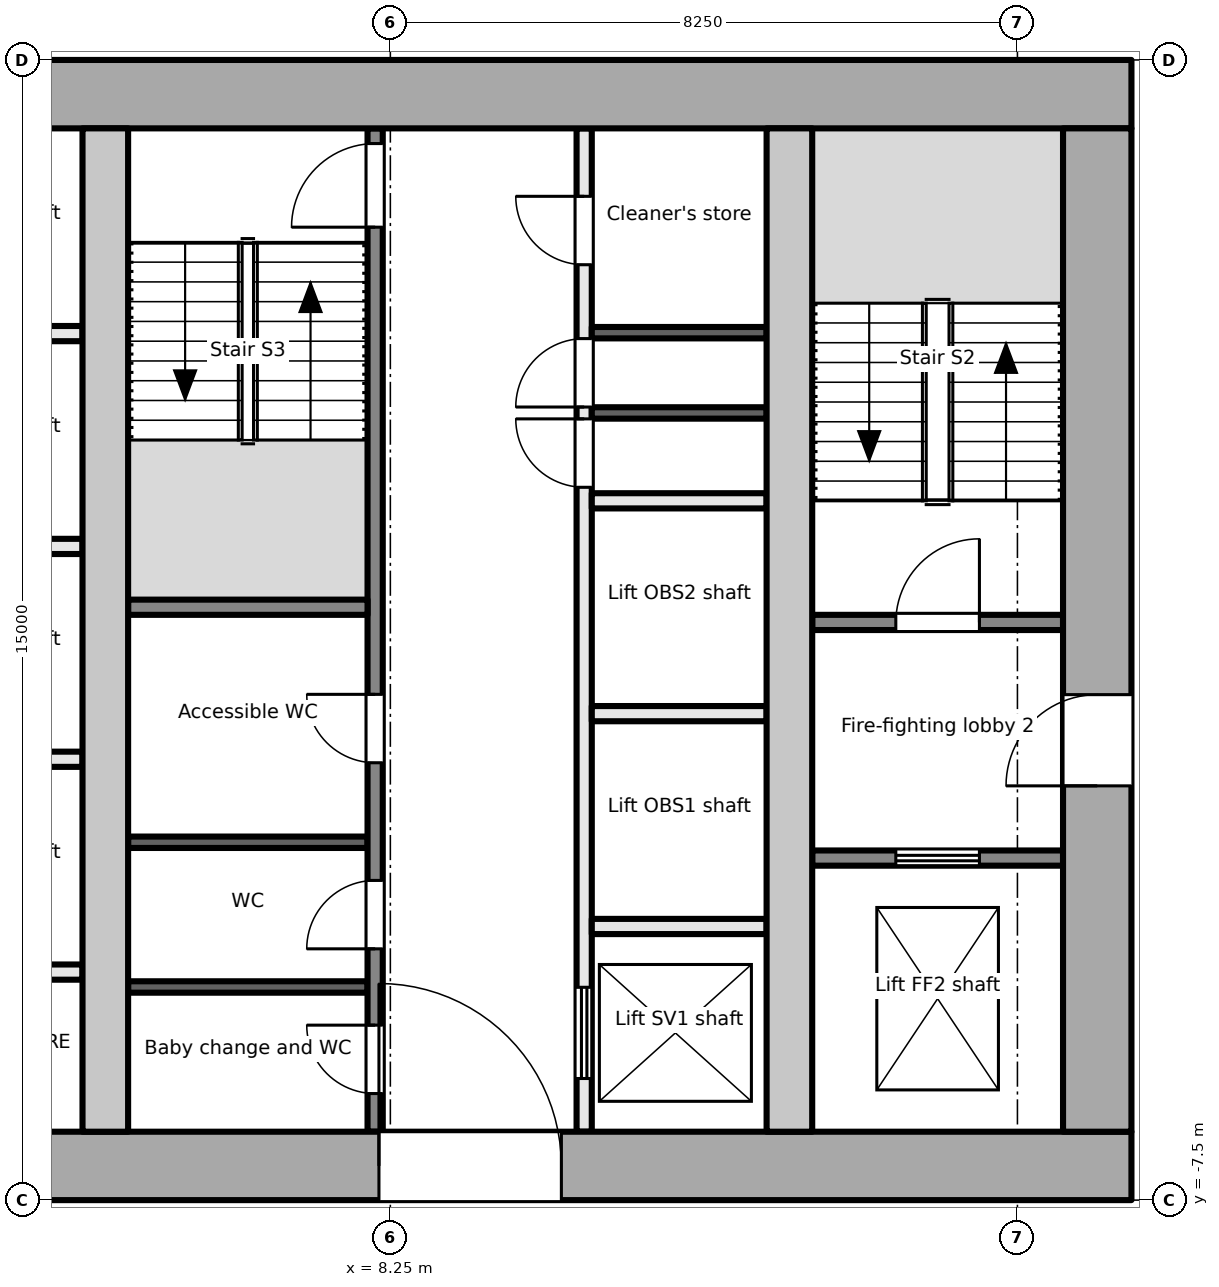
"""IFC4 building model, lengths in metres.
Left out: names, types, materials, properties, quantities, classifications, styles, units other than length and angle.
Written with IfcOpenShell. Run it as: python <this file> out.ifc"""

import sys

from ifc_helpers import new_model, si_unit, direction, frame, frame_2d, origin, place, context, subcontext, project, spatial, rectangle, extrude, element, fill, save


model = new_model("IFC4")
c1 = context("Model", 3, precision=1e-05, world=origin(), true_north=direction((0.0, 1.0)))
c2 = subcontext(c1, "Body", "Model", "MODEL_VIEW")
j1 = project(units=[si_unit("LENGTHUNIT", "METRE"), si_unit("PLANEANGLEUNIT", "RADIAN")], contexts=[c1])
p1 = place(None, origin())
s1 = spatial("IfcSite", under=j1, at=p1, CompositionType="ELEMENT")
p2 = place(p1, origin())
s2 = spatial("IfcBuilding", under=s1, at=p2, CompositionType="ELEMENT")
p3 = place(p2, frame((0.0, 0.0, 52.9)))
s3 = spatial("IfcBuildingStorey", under=s2, at=p3, CompositionType="ELEMENT", Elevation=52.9)
p4 = place(p3, frame((-18.0, -7.05, -0.2), z_axis=(0.0, 0.0, 1.0), x_axis=(1.0, 0.0, 0.0)))
e1 = element("IfcWall", 1, at=p4, inside=s3, PredefinedType="SHEAR", context=c2, shape_type="SweptSolid", body=[
    extrude(rectangle(XDim=36.0, YDim=0.9, at=frame_2d((18.0, 0.0))), origin(), (0.0, 0.0, 1.0), 4.1),
])
p5 = place(p4, frame((7.8, 0.0, 0.2)))
e2 = element("IfcOpeningElement", 2, at=p5, cuts=e1, PredefinedType="OPENING", context=c2, shape_type="SweptSolid", body=[
    extrude(rectangle(XDim=2.4, YDim=2.1, at=frame_2d((1.2, 1.05))), frame((0.0, 0.46, 0.0), z_axis=(0.0, -1.0, 0.0), x_axis=(1.0, 0.0, 0.0)), (0.0, 0.0, 1.0), 0.921),
])
p6 = place(p4, frame((17.4, 0.0, 0.2)))
e3 = element("IfcOpeningElement", 3, at=p6, cuts=e1, PredefinedType="OPENING", context=c2, shape_type="SweptSolid", body=[
    extrude(rectangle(XDim=1.2, YDim=2.1, at=frame_2d((0.6, 1.05))), frame((0.0, 0.46, 0.0), z_axis=(0.0, -1.0, 0.0), x_axis=(1.0, 0.0, 0.0)), (0.0, 0.0, 1.0), 0.921),
])
p7 = place(p4, frame((26.1, 0.0, 0.2)))
e4 = element("IfcOpeningElement", 4, at=p7, cuts=e1, PredefinedType="OPENING", context=c2, shape_type="SweptSolid", body=[
    extrude(rectangle(XDim=2.4, YDim=2.1, at=frame_2d((1.2, 1.05))), frame((0.0, 0.46, 0.0), z_axis=(0.0, -1.0, 0.0), x_axis=(1.0, 0.0, 0.0)), (0.0, 0.0, 1.0), 0.921),
])
p8 = place(p3, frame((-18.0, 7.05, -0.2), z_axis=(0.0, 0.0, 1.0), x_axis=(1.0, 0.0, 0.0)))
e5 = element("IfcWall", 5, at=p8, inside=s3, PredefinedType="SHEAR", context=c2, shape_type="SweptSolid", body=[
    extrude(rectangle(XDim=36.0, YDim=0.9, at=frame_2d((18.0, 0.0))), origin(), (0.0, 0.0, 1.0), 4.1),
])
p9 = place(p3, frame((17.55, -6.6, -0.2), z_axis=(0.0, 0.0, 1.0), x_axis=(0.0, 1.0, 0.0)))
e6 = element("IfcWall", 6, at=p9, inside=s3, PredefinedType="SHEAR", context=c2, shape_type="SweptSolid", body=[
    extrude(rectangle(XDim=13.2, YDim=0.9, at=frame_2d((6.6, 0.0))), origin(), (0.0, 0.0, 1.0), 4.1),
])
p10 = place(p9, frame((4.55, 0.0, 0.2)))
e7 = element("IfcOpeningElement", 7, at=p10, cuts=e6, PredefinedType="OPENING", context=c2, shape_type="SweptSolid", body=[
    extrude(rectangle(XDim=1.2, YDim=2.1, at=frame_2d((0.6, 1.05))), frame((0.0, 0.46, 0.0), z_axis=(0.0, -1.0, 0.0), x_axis=(1.0, 0.0, 0.0)), (0.0, 0.0, 1.0), 0.921),
])
for number, where, z_axis, x_axis in (
    (8, (4.5, -6.6, -0.2), (0.0, 0.0, 1.0), (0.0, 1.0, 0.0)),
    (9, (13.5, -6.6, -0.2), (0.0, 0.0, 1.0), (0.0, 1.0, 0.0)),
):
    element("IfcWall", number, at=place(p3, frame(where, z_axis=z_axis, x_axis=x_axis)), inside=s3, PredefinedType="SHEAR", context=c2, shape_type="SweptSolid", body=[
        extrude(rectangle(XDim=13.2, YDim=0.6, at=frame_2d((6.6, 0.0))), origin(), (0.0, 0.0, 1.0), 4.1),
    ])
p11 = place(p3, frame((13.8, -3.0, 0.0), z_axis=(0.0, 0.0, 1.0), x_axis=(1.0, 0.0, 0.0)))
e10 = element("IfcWall", 10, at=p11, inside=s3, PredefinedType="PARTITIONING", context=c2, shape_type="SweptSolid", body=[
    extrude(rectangle(XDim=3.3, YDim=0.2, at=frame_2d((1.65, 0.0))), origin(), (0.0, 0.0, 1.0), 3.9),
])
p12 = place(p11, frame((1.1, 0.0, 0.0)))
e11 = element("IfcOpeningElement", 11, at=p12, cuts=e10, PredefinedType="OPENING", context=c2, shape_type="SweptSolid", body=[
    extrude(rectangle(XDim=1.1, YDim=2.1, at=frame_2d((0.55, 1.05))), frame((0.0, 0.111, 0.0), z_axis=(0.0, -1.0, 0.0), x_axis=(1.0, 0.0, 0.0)), (0.0, 0.0, 1.0), 0.221),
])
p13 = place(p3, frame((13.8, 0.1, 0.0), z_axis=(0.0, 0.0, 1.0), x_axis=(1.0, 0.0, 0.0)))
e12 = element("IfcWall", 12, at=p13, inside=s3, PredefinedType="PARTITIONING", context=c2, shape_type="SweptSolid", body=[
    extrude(rectangle(XDim=3.3, YDim=0.2, at=frame_2d((1.65, 0.0))), origin(), (0.0, 0.0, 1.0), 3.9),
])
p14 = place(p13, frame((1.1, 0.0, 0.0)))
e13 = element("IfcOpeningElement", 13, at=p14, cuts=e12, PredefinedType="OPENING", context=c2, shape_type="SweptSolid", body=[
    extrude(rectangle(XDim=1.1, YDim=2.1, at=frame_2d((0.55, 1.05))), frame((0.0, 0.111, 0.0), z_axis=(0.0, -1.0, 0.0), x_axis=(1.0, 0.0, 0.0)), (0.0, 0.0, 1.0), 0.221),
])
for number, where, z_axis, x_axis in (
    (14, (1.9, -1.7, 0.0), (0.0, 0.0, 1.0), (1.0, 0.0, 0.0)),
    (15, (1.9, 1.1, 0.0), (0.0, 0.0, 1.0), (1.0, 0.0, 0.0)),
    (16, (1.9, 3.9, 0.0), (0.0, 0.0, 1.0), (1.0, 0.0, 0.0)),
    (17, (1.9, -4.5, 0.0), (0.0, 0.0, 1.0), (1.0, 0.0, 0.0)),
):
    element("IfcWall", number, at=place(p3, frame(where, z_axis=z_axis, x_axis=x_axis)), inside=s3, PredefinedType="PARTITIONING", context=c2, shape_type="SweptSolid", body=[
        extrude(rectangle(XDim=2.3, YDim=0.2, at=frame_2d((1.15, 0.0))), origin(), (0.0, 0.0, 1.0), 3.9),
    ])
p15 = place(p3, frame((8.05, -6.6, 0.0), z_axis=(0.0, 0.0, 1.0), x_axis=(0.0, 1.0, 0.0)))
e18 = element("IfcWall", 18, at=p15, inside=s3, PredefinedType="PARTITIONING", context=c2, shape_type="SweptSolid", body=[
    extrude(rectangle(XDim=13.2, YDim=0.2, at=frame_2d((6.6, 0.0))), origin(), (0.0, 0.0, 1.0), 3.9),
])
p16 = place(p15, frame((0.502, 0.0, 0.0)))
e19 = element("IfcOpeningElement", 19, at=p16, cuts=e18, PredefinedType="OPENING", context=c2, shape_type="SweptSolid", body=[
    extrude(rectangle(XDim=0.9, YDim=2.1, at=frame_2d((0.45, 1.05))), frame((0.0, 0.111, 0.0), z_axis=(0.0, -1.0, 0.0), x_axis=(1.0, 0.0, 0.0)), (0.0, 0.0, 1.0), 0.221),
])
p17 = place(p15, frame((2.406, 0.0, 0.0)))
e20 = element("IfcOpeningElement", 20, at=p17, cuts=e18, PredefinedType="OPENING", context=c2, shape_type="SweptSolid", body=[
    extrude(rectangle(XDim=0.9, YDim=2.1, at=frame_2d((0.45, 1.05))), frame((0.0, 0.111, 0.0), z_axis=(0.0, -1.0, 0.0), x_axis=(1.0, 0.0, 0.0)), (0.0, 0.0, 1.0), 0.221),
])
p18 = place(p15, frame((4.854, 0.0, 0.0)))
e21 = element("IfcOpeningElement", 21, at=p18, cuts=e18, PredefinedType="OPENING", context=c2, shape_type="SweptSolid", body=[
    extrude(rectangle(XDim=0.9, YDim=2.1, at=frame_2d((0.45, 1.05))), frame((0.0, 0.111, 0.0), z_axis=(0.0, -1.0, 0.0), x_axis=(1.0, 0.0, 0.0)), (0.0, 0.0, 1.0), 0.221),
])
p19 = place(p15, frame((11.9, 0.0, 0.0)))
e22 = element("IfcOpeningElement", 22, at=p19, cuts=e18, PredefinedType="OPENING", context=c2, shape_type="SweptSolid", body=[
    extrude(rectangle(XDim=1.1, YDim=2.1, at=frame_2d((0.55, 1.05))), frame((0.0, 0.111, 0.0), z_axis=(0.0, -1.0, 0.0), x_axis=(1.0, 0.0, 0.0)), (0.0, 0.0, 1.0), 0.221),
])
p20 = place(p3, frame((10.8, -6.6, 0.0), z_axis=(0.0, 0.0, 1.0), x_axis=(0.0, 1.0, 0.0)))
e23 = element("IfcWall", 23, at=p20, inside=s3, PredefinedType="PARTITIONING", context=c2, shape_type="SweptSolid", body=[
    extrude(rectangle(XDim=13.2, YDim=0.2, at=frame_2d((6.6, 0.0))), origin(), (0.0, 0.0, 1.0), 3.9),
])
p21 = place(p20, frame((0.7, 0.0, 0.0)))
e24 = element("IfcOpeningElement", 24, at=p21, cuts=e23, PredefinedType="OPENING", context=c2, shape_type="SweptSolid", body=[
    extrude(rectangle(XDim=1.2, YDim=2.1, at=frame_2d((0.6, 1.05))), frame((0.0, 0.111, 0.0), z_axis=(0.0, -1.0, 0.0), x_axis=(1.0, 0.0, 0.0)), (0.0, 0.0, 1.0), 0.221),
])
p22 = place(p20, frame((8.478, 0.0, 0.0)))
e25 = element("IfcOpeningElement", 25, at=p22, cuts=e23, PredefinedType="OPENING", context=c2, shape_type="SweptSolid", body=[
    extrude(rectangle(XDim=0.9, YDim=2.1, at=frame_2d((0.45, 1.05))), frame((0.0, 0.111, 0.0), z_axis=(0.0, -1.0, 0.0), x_axis=(1.0, 0.0, 0.0)), (0.0, 0.0, 1.0), 0.221),
])
p23 = place(p20, frame((9.534, 0.0, 0.0)))
e26 = element("IfcOpeningElement", 26, at=p23, cuts=e23, PredefinedType="OPENING", context=c2, shape_type="SweptSolid", body=[
    extrude(rectangle(XDim=0.9, YDim=2.1, at=frame_2d((0.45, 1.05))), frame((0.0, 0.111, 0.0), z_axis=(0.0, -1.0, 0.0), x_axis=(1.0, 0.0, 0.0)), (0.0, 0.0, 1.0), 0.221),
])
p24 = place(p20, frame((11.406, 0.0, 0.0)))
e27 = element("IfcOpeningElement", 27, at=p24, cuts=e23, PredefinedType="OPENING", context=c2, shape_type="SweptSolid", body=[
    extrude(rectangle(XDim=0.9, YDim=2.1, at=frame_2d((0.45, 1.05))), frame((0.0, 0.111, 0.0), z_axis=(0.0, -1.0, 0.0), x_axis=(1.0, 0.0, 0.0)), (0.0, 0.0, 1.0), 0.221),
])
p25 = place(p3, frame((4.8, 0.3, 0.0), z_axis=(0.0, 0.0, 1.0), x_axis=(1.0, 0.0, 0.0)))
e28 = element("IfcWall", 28, at=p25, inside=s3, PredefinedType="PARTITIONING", context=c2, shape_type="SweptSolid", body=[
    extrude(rectangle(XDim=3.15, YDim=0.2, at=frame_2d((1.575, 0.0))), origin(), (0.0, 0.0, 1.0), 3.9),
])
for number, where, z_axis, x_axis in (
    (29, (4.8, -4.696, 0.0), (0.0, 0.0, 1.0), (1.0, 0.0, 0.0)),
    (30, (4.8, -2.792, 0.0), (0.0, 0.0, 1.0), (1.0, 0.0, 0.0)),
):
    element("IfcWall", number, at=place(p3, frame(where, z_axis=z_axis, x_axis=x_axis)), inside=s3, PredefinedType="PARTITIONING", context=c2, shape_type="SweptSolid", body=[
        extrude(rectangle(XDim=3.15, YDim=0.15, at=frame_2d((1.575, 0.0))), origin(), (0.0, 0.0, 1.0), 3.9),
    ])
for number, where, z_axis, x_axis in (
    (31, (10.9, -3.9, 0.0), (0.0, 0.0, 1.0), (1.0, 0.0, 0.0)),
    (32, (10.9, -1.1, 0.0), (0.0, 0.0, 1.0), (1.0, 0.0, 0.0)),
    (33, (10.9, 1.7, 0.0), (0.0, 0.0, 1.0), (1.0, 0.0, 0.0)),
):
    element("IfcWall", number, at=place(p3, frame(where, z_axis=z_axis, x_axis=x_axis)), inside=s3, PredefinedType="PARTITIONING", context=c2, shape_type="SweptSolid", body=[
        extrude(rectangle(XDim=2.3, YDim=0.2, at=frame_2d((1.15, 0.0))), origin(), (0.0, 0.0, 1.0), 3.9),
    ])
for number, where, z_axis, x_axis in (
    (34, (10.9, 2.856, 0.0), (0.0, 0.0, 1.0), (1.0, 0.0, 0.0)),
    (35, (10.9, 3.912, 0.0), (0.0, 0.0, 1.0), (1.0, 0.0, 0.0)),
):
    element("IfcWall", number, at=place(p3, frame(where, z_axis=z_axis, x_axis=x_axis)), inside=s3, PredefinedType="PARTITIONING", context=c2, shape_type="SweptSolid", body=[
        extrude(rectangle(XDim=2.3, YDim=0.15, at=frame_2d((1.15, 0.0))), origin(), (0.0, 0.0, 1.0), 3.9),
    ])
p26 = place(p12, origin())
e36 = element("IfcDoor", 36, at=p26, inside=s3, OperationType="DOUBLE_DOOR_SLIDING", PredefinedType="DOOR", context=c2, shape_type="SweptSolid", body=[
    extrude(rectangle(XDim=1.1, YDim=2.1, at=frame_2d((0.55, 1.05))), frame((0.0, 0.025, 0.0), z_axis=(0.0, -1.0, 0.0), x_axis=(1.0, 0.0, 0.0)), (0.0, 0.0, 1.0), 0.05),
])
fill(e11, e36)
p27 = place(p10, origin())
e37 = element("IfcDoor", 37, at=p27, inside=s3, OperationType="SINGLE_SWING_LEFT", PredefinedType="DOOR", context=c2, shape_type="SweptSolid", body=[
    extrude(rectangle(XDim=1.2, YDim=2.1, at=frame_2d((0.6, 1.05))), frame((0.0, 0.025, 0.0), z_axis=(0.0, -1.0, 0.0), x_axis=(1.0, 0.0, 0.0)), (0.0, 0.0, 1.0), 0.05),
])
fill(e7, e37)
p28 = place(p14, origin())
e38 = element("IfcDoor", 38, at=p28, inside=s3, OperationType="SINGLE_SWING_RIGHT", PredefinedType="DOOR", context=c2, shape_type="SweptSolid", body=[
    extrude(rectangle(XDim=1.1, YDim=2.1, at=frame_2d((0.55, 1.05))), frame((0.0, 0.025, 0.0), z_axis=(0.0, -1.0, 0.0), x_axis=(1.0, 0.0, 0.0)), (0.0, 0.0, 1.0), 0.05),
])
fill(e13, e38)
p29 = place(p16, origin())
e39 = element("IfcDoor", 39, at=p29, inside=s3, OperationType="SINGLE_SWING_RIGHT", PredefinedType="DOOR", context=c2, shape_type="SweptSolid", body=[
    extrude(rectangle(XDim=0.9, YDim=2.1, at=frame_2d((0.45, 1.05))), frame((0.0, 0.025, 0.0), z_axis=(0.0, -1.0, 0.0), x_axis=(1.0, 0.0, 0.0)), (0.0, 0.0, 1.0), 0.05),
])
fill(e19, e39)
p30 = place(p17, origin())
e40 = element("IfcDoor", 40, at=p30, inside=s3, OperationType="SINGLE_SWING_LEFT", PredefinedType="DOOR", context=c2, shape_type="SweptSolid", body=[
    extrude(rectangle(XDim=0.9, YDim=2.1, at=frame_2d((0.45, 1.05))), frame((0.0, 0.025, 0.0), z_axis=(0.0, -1.0, 0.0), x_axis=(1.0, 0.0, 0.0)), (0.0, 0.0, 1.0), 0.05),
])
fill(e20, e40)
p31 = place(p18, origin())
e41 = element("IfcDoor", 41, at=p31, inside=s3, OperationType="SINGLE_SWING_RIGHT", PredefinedType="DOOR", context=c2, shape_type="SweptSolid", body=[
    extrude(rectangle(XDim=0.9, YDim=2.1, at=frame_2d((0.45, 1.05))), frame((0.0, 0.025, 0.0), z_axis=(0.0, -1.0, 0.0), x_axis=(1.0, 0.0, 0.0)), (0.0, 0.0, 1.0), 0.05),
])
fill(e21, e41)
p32 = place(p19, origin())
e42 = element("IfcDoor", 42, at=p32, inside=s3, OperationType="SINGLE_SWING_LEFT", PredefinedType="DOOR", context=c2, shape_type="SweptSolid", body=[
    extrude(rectangle(XDim=1.1, YDim=2.1, at=frame_2d((0.55, 1.05))), frame((0.0, 0.025, 0.0), z_axis=(0.0, -1.0, 0.0), x_axis=(1.0, 0.0, 0.0)), (0.0, 0.0, 1.0), 0.05),
])
fill(e22, e42)
p33 = place(p7, origin())
e43 = element("IfcDoor", 43, at=p33, inside=s3, OperationType="DOUBLE_DOOR_DOUBLE_SWING", PredefinedType="DOOR", context=c2, shape_type="SweptSolid", body=[
    extrude(rectangle(XDim=2.4, YDim=2.1, at=frame_2d((1.2, 1.05))), frame((0.0, 0.025, 0.0), z_axis=(0.0, -1.0, 0.0), x_axis=(1.0, 0.0, 0.0)), (0.0, 0.0, 1.0), 0.05),
])
fill(e4, e43)
p34 = place(p21, origin())
e44 = element("IfcDoor", 44, at=p34, inside=s3, OperationType="DOUBLE_DOOR_SLIDING", PredefinedType="DOOR", context=c2, shape_type="SweptSolid", body=[
    extrude(rectangle(XDim=1.2, YDim=2.1, at=frame_2d((0.6, 1.05))), frame((0.0, 0.025, 0.0), z_axis=(0.0, -1.0, 0.0), x_axis=(1.0, 0.0, 0.0)), (0.0, 0.0, 1.0), 0.05),
])
fill(e24, e44)
p35 = place(p22, origin())
e45 = element("IfcDoor", 45, at=p35, inside=s3, OperationType="SINGLE_SWING_RIGHT", PredefinedType="DOOR", context=c2, shape_type="SweptSolid", body=[
    extrude(rectangle(XDim=0.9, YDim=2.1, at=frame_2d((0.45, 1.05))), frame((0.0, 0.025, 0.0), z_axis=(0.0, -1.0, 0.0), x_axis=(1.0, 0.0, 0.0)), (0.0, 0.0, 1.0), 0.05),
])
fill(e25, e45)
p36 = place(p23, origin())
e46 = element("IfcDoor", 46, at=p36, inside=s3, OperationType="SINGLE_SWING_LEFT", PredefinedType="DOOR", context=c2, shape_type="SweptSolid", body=[
    extrude(rectangle(XDim=0.9, YDim=2.1, at=frame_2d((0.45, 1.05))), frame((0.0, 0.025, 0.0), z_axis=(0.0, -1.0, 0.0), x_axis=(1.0, 0.0, 0.0)), (0.0, 0.0, 1.0), 0.05),
])
fill(e26, e46)
p37 = place(p24, origin())
e47 = element("IfcDoor", 47, at=p37, inside=s3, OperationType="SINGLE_SWING_RIGHT", PredefinedType="DOOR", context=c2, shape_type="SweptSolid", body=[
    extrude(rectangle(XDim=0.9, YDim=2.1, at=frame_2d((0.45, 1.05))), frame((0.0, 0.025, 0.0), z_axis=(0.0, -1.0, 0.0), x_axis=(1.0, 0.0, 0.0)), (0.0, 0.0, 1.0), 0.05),
])
fill(e27, e47)
save(model, sys.argv[1])
